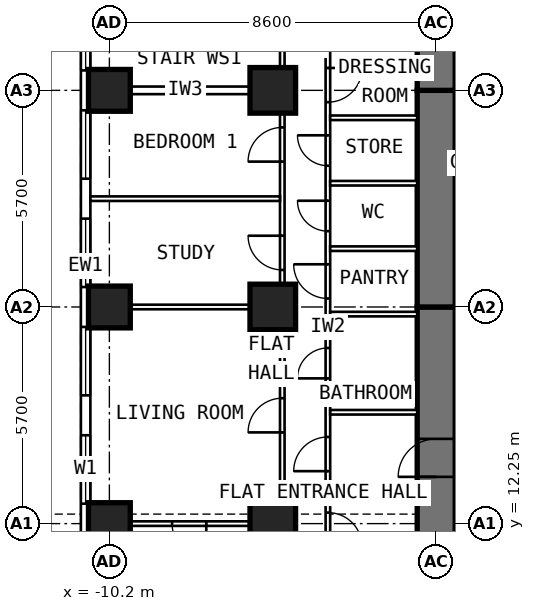
"""IFC4 building model, lengths in metres.
Left out: names, types, materials, properties, quantities, classifications, styles, units other than length and angle.
Written with IfcOpenShell. Run it as: python <this file> out.ifc"""

import sys

from ifc_helpers import new_model, si_unit, direction, frame, frame_2d, origin, origin_2d, place, context, subcontext, project, spatial, rectangle, extrude, element, fill, save


model = new_model("IFC4")
c1 = context("Model", 3, precision=1e-05, world=origin(), true_north=direction((0.0, 1.0)))
c2 = subcontext(c1, "Body", "Model", "MODEL_VIEW")
j1 = project(units=[si_unit("LENGTHUNIT", "METRE"), si_unit("PLANEANGLEUNIT", "RADIAN")], contexts=[c1])
p1 = place(None, origin())
s1 = spatial("IfcSite", under=j1, at=p1, CompositionType="ELEMENT")
p2 = place(p1, origin())
s2 = spatial("IfcBuilding", under=s1, at=p2, CompositionType="ELEMENT")
p3 = place(p2, frame((0.0, 0.0, 28.8)))
s3 = spatial("IfcBuildingStorey", under=s2, at=p3, CompositionType="ELEMENT", Elevation=28.8)
for number, where, z_axis, x_axis in (
    (1, (-10.2, 12.25, 0.0), (0.0, 0.0, 1.0), (0.0, 1.0, 0.0)),
    (2, (-10.2, 17.95, 0.0), (0.0, 0.0, 1.0), (0.0, 1.0, 0.0)),
    (3, (-10.2, 23.65, 0.0), (0.0, 0.0, 1.0), (0.0, 1.0, 0.0)),
):
    element("IfcColumn", number, at=place(p3, frame(where, z_axis=z_axis, x_axis=x_axis)), inside=s3, PredefinedType="COLUMN", context=c2, shape_type="SweptSolid", body=[
        extrude(rectangle(XDim=1.1, YDim=1.1, at=origin_2d()), origin(), (0.0, 0.0, 1.0), 3.6),
    ])
for number, where, z_axis, x_axis in (
    (4, (-5.9, 12.25, 0.0), (0.0, 0.0, 1.0), (0.0, 1.0, 0.0)),
    (5, (-5.9, 17.95, 0.0), (0.0, 0.0, 1.0), (0.0, 1.0, 0.0)),
    (6, (-5.9, 23.65, 0.0), (0.0, 0.0, 1.0), (0.0, 1.0, 0.0)),
):
    element("IfcColumn", number, at=place(p3, frame(where, z_axis=z_axis, x_axis=x_axis)), inside=s3, PredefinedType="COLUMN", context=c2, shape_type="SweptSolid", body=[
        extrude(rectangle(XDim=1.2, YDim=1.2, at=origin_2d()), origin(), (0.0, 0.0, 1.0), 3.6),
    ])
p4 = place(p3, frame((-1.6, 9.6, 0.0), z_axis=(0.0, 0.0, 1.0), x_axis=(0.0, 1.0, 0.0)))
e7 = element("IfcWall", 7, at=p4, inside=s3, PredefinedType="SHEAR", context=c2, shape_type="SweptSolid", body=[
    extrude(rectangle(XDim=8.35, YDim=1.0, at=frame_2d((4.175, 0.0))), origin(), (0.0, 0.0, 1.0), 3.6),
])
p5 = place(p4, frame((3.88, 0.0, 0.0)))
e8 = element("IfcOpeningElement", 8, at=p5, cuts=e7, PredefinedType="OPENING", context=c2, shape_type="SweptSolid", body=[
    extrude(rectangle(XDim=1.0, YDim=2.1, at=frame_2d((0.5, 1.05))), frame((0.0, 0.512, 0.0), z_axis=(0.0, -1.0, 0.0), x_axis=(1.0, 0.0, 0.0)), (0.0, 0.0, 1.0), 1.024),
])
p6 = place(p3, frame((-1.6, 17.95, 0.0), z_axis=(0.0, 0.0, 1.0), x_axis=(0.0, 1.0, 0.0)))
e9 = element("IfcWall", 9, at=p6, inside=s3, PredefinedType="SHEAR", context=c2, shape_type="SweptSolid", body=[
    extrude(rectangle(XDim=5.7, YDim=1.0, at=frame_2d((2.85, 0.0))), origin(), (0.0, 0.0, 1.0), 3.6),
])
p7 = place(p3, frame((-1.6, 23.65, 0.0), z_axis=(0.0, 0.0, 1.0), x_axis=(0.0, 1.0, 0.0)))
e10 = element("IfcWall", 10, at=p7, inside=s3, PredefinedType="SHEAR", context=c2, shape_type="SweptSolid", body=[
    extrude(rectangle(XDim=10.745, YDim=1.0, at=frame_2d((5.373, 0.0))), origin(), (0.0, 0.0, 1.0), 3.6),
])
p8 = place(p7, frame((6.1, 0.0, 0.0)))
e11 = element("IfcOpeningElement", 11, at=p8, cuts=e10, PredefinedType="OPENING", context=c2, shape_type="SweptSolid", body=[
    extrude(rectangle(XDim=1.0, YDim=2.1, at=frame_2d((0.5, 1.05))), frame((0.0, 0.512, 0.0), z_axis=(0.0, -1.0, 0.0), x_axis=(1.0, 0.0, 0.0)), (0.0, 0.0, 1.0), 1.024),
])
p9 = place(p7, frame((1.35, 0.0, 0.0)))
e12 = element("IfcOpeningElement", 12, at=p9, cuts=e10, PredefinedType="OPENING", context=c2, shape_type="SweptSolid", body=[
    extrude(rectangle(XDim=1.0, YDim=2.1, at=frame_2d((0.5, 1.05))), frame((0.0, 0.512, 0.0), z_axis=(0.0, -1.0, 0.0), x_axis=(1.0, 0.0, 0.0)), (0.0, 0.0, 1.0), 1.024),
])
p10 = place(p3, frame((-10.825, 6.409, 0.0), z_axis=(0.0, 0.0, 1.0), x_axis=(0.0, 1.0, 0.0)))
e13 = element("IfcWall", 13, at=p10, inside=s3, PredefinedType="SOLIDWALL", context=c2, shape_type="SweptSolid", body=[
    extrude(rectangle(XDim=25.226, YDim=0.25, at=frame_2d((12.613, 0.0))), origin(), (0.0, 0.0, 1.0), 3.3),
])
p11 = place(p10, frame((0.666, 0.0, 0.8)))
e14 = element("IfcOpeningElement", 14, at=p11, cuts=e13, PredefinedType="OPENING", context=c2, shape_type="SweptSolid", body=[
    extrude(rectangle(XDim=1.8, YDim=1.8, at=frame_2d((0.9, 0.9))), frame((0.0, 0.137, 0.0), z_axis=(0.0, -1.0, 0.0), x_axis=(1.0, 0.0, 0.0)), (0.0, 0.0, 1.0), 0.274),
])
p12 = place(p10, frame((3.516, 0.0, 0.8)))
e15 = element("IfcOpeningElement", 15, at=p12, cuts=e13, PredefinedType="OPENING", context=c2, shape_type="SweptSolid", body=[
    extrude(rectangle(XDim=1.8, YDim=1.8, at=frame_2d((0.9, 0.9))), frame((0.0, 0.137, 0.0), z_axis=(0.0, -1.0, 0.0), x_axis=(1.0, 0.0, 0.0)), (0.0, 0.0, 1.0), 0.274),
])
p13 = place(p10, frame((6.366, 0.0, 0.8)))
e16 = element("IfcOpeningElement", 16, at=p13, cuts=e13, PredefinedType="OPENING", context=c2, shape_type="SweptSolid", body=[
    extrude(rectangle(XDim=1.8, YDim=1.8, at=frame_2d((0.9, 0.9))), frame((0.0, 0.137, 0.0), z_axis=(0.0, -1.0, 0.0), x_axis=(1.0, 0.0, 0.0)), (0.0, 0.0, 1.0), 0.274),
])
p14 = place(p10, frame((9.216, 0.0, 0.8)))
e17 = element("IfcOpeningElement", 17, at=p14, cuts=e13, PredefinedType="OPENING", context=c2, shape_type="SweptSolid", body=[
    extrude(rectangle(XDim=1.8, YDim=1.8, at=frame_2d((0.9, 0.9))), frame((0.0, 0.137, 0.0), z_axis=(0.0, -1.0, 0.0), x_axis=(1.0, 0.0, 0.0)), (0.0, 0.0, 1.0), 0.274),
])
p15 = place(p10, frame((12.066, 0.0, 0.8)))
e18 = element("IfcOpeningElement", 18, at=p15, cuts=e13, PredefinedType="OPENING", context=c2, shape_type="SweptSolid", body=[
    extrude(rectangle(XDim=1.8, YDim=1.8, at=frame_2d((0.9, 0.9))), frame((0.0, 0.137, 0.0), z_axis=(0.0, -1.0, 0.0), x_axis=(1.0, 0.0, 0.0)), (0.0, 0.0, 1.0), 0.274),
])
p16 = place(p10, frame((14.916, 0.0, 0.8)))
e19 = element("IfcOpeningElement", 19, at=p16, cuts=e13, PredefinedType="OPENING", context=c2, shape_type="SweptSolid", body=[
    extrude(rectangle(XDim=1.8, YDim=1.8, at=frame_2d((0.9, 0.9))), frame((0.0, 0.137, 0.0), z_axis=(0.0, -1.0, 0.0), x_axis=(1.0, 0.0, 0.0)), (0.0, 0.0, 1.0), 0.274),
])
p17 = place(p10, frame((17.766, 0.0, 0.8)))
e20 = element("IfcOpeningElement", 20, at=p17, cuts=e13, PredefinedType="OPENING", context=c2, shape_type="SweptSolid", body=[
    extrude(rectangle(XDim=1.8, YDim=1.8, at=frame_2d((0.9, 0.9))), frame((0.0, 0.137, 0.0), z_axis=(0.0, -1.0, 0.0), x_axis=(1.0, 0.0, 0.0)), (0.0, 0.0, 1.0), 0.274),
])
p18 = place(p10, frame((20.616, 0.0, 0.8)))
e21 = element("IfcOpeningElement", 21, at=p18, cuts=e13, PredefinedType="OPENING", context=c2, shape_type="SweptSolid", body=[
    extrude(rectangle(XDim=1.8, YDim=1.8, at=frame_2d((0.9, 0.9))), frame((0.0, 0.137, 0.0), z_axis=(0.0, -1.0, 0.0), x_axis=(1.0, 0.0, 0.0)), (0.0, 0.0, 1.0), 0.274),
])
p19 = place(p3, frame((-4.45, 10.1, 0.0), z_axis=(0.0, 0.0, 1.0), x_axis=(0.0, 1.0, 0.0)))
e22 = element("IfcWall", 22, at=p19, inside=s3, PredefinedType="PARTITIONING", context=c2, shape_type="SweptSolid", body=[
    extrude(rectangle(XDim=14.65, YDim=0.12, at=frame_2d((7.325, 0.0))), origin(), (0.0, 0.0, 1.0), 3.3),
])
p20 = place(p19, frame((1.54, 0.0, 0.0)))
e23 = element("IfcOpeningElement", 23, at=p20, cuts=e22, PredefinedType="OPENING", context=c2, shape_type="SweptSolid", body=[
    extrude(rectangle(XDim=0.9, YDim=2.1, at=frame_2d((0.45, 1.05))), frame((0.0, 0.072, 0.0), z_axis=(0.0, -1.0, 0.0), x_axis=(1.0, 0.0, 0.0)), (0.0, 0.0, 1.0), 0.144),
])
p21 = place(p19, frame((3.53, 0.0, 0.0)))
e24 = element("IfcOpeningElement", 24, at=p21, cuts=e22, PredefinedType="OPENING", context=c2, shape_type="SweptSolid", body=[
    extrude(rectangle(XDim=0.9, YDim=2.1, at=frame_2d((0.45, 1.05))), frame((0.0, 0.072, 0.0), z_axis=(0.0, -1.0, 0.0), x_axis=(1.0, 0.0, 0.0)), (0.0, 0.0, 1.0), 0.144),
])
p22 = place(p19, frame((5.971, 0.0, 0.0)))
e25 = element("IfcOpeningElement", 25, at=p22, cuts=e22, PredefinedType="OPENING", context=c2, shape_type="SweptSolid", body=[
    extrude(rectangle(XDim=0.8, YDim=2.1, at=frame_2d((0.4, 1.05))), frame((0.0, 0.072, 0.0), z_axis=(0.0, -1.0, 0.0), x_axis=(1.0, 0.0, 0.0)), (0.0, 0.0, 1.0), 0.144),
])
p23 = place(p19, frame((8.074, 0.0, 0.0)))
e26 = element("IfcOpeningElement", 26, at=p23, cuts=e22, PredefinedType="OPENING", context=c2, shape_type="SweptSolid", body=[
    extrude(rectangle(XDim=0.9, YDim=2.1, at=frame_2d((0.45, 1.05))), frame((0.0, 0.072, 0.0), z_axis=(0.0, -1.0, 0.0), x_axis=(1.0, 0.0, 0.0)), (0.0, 0.0, 1.0), 0.144),
])
p24 = place(p19, frame((9.845, 0.0, 0.0)))
e27 = element("IfcOpeningElement", 27, at=p24, cuts=e22, PredefinedType="OPENING", context=c2, shape_type="SweptSolid", body=[
    extrude(rectangle(XDim=0.8, YDim=2.1, at=frame_2d((0.4, 1.05))), frame((0.0, 0.072, 0.0), z_axis=(0.0, -1.0, 0.0), x_axis=(1.0, 0.0, 0.0)), (0.0, 0.0, 1.0), 0.144),
])
p25 = place(p19, frame((11.567, 0.0, 0.0)))
e28 = element("IfcOpeningElement", 28, at=p25, cuts=e22, PredefinedType="OPENING", context=c2, shape_type="SweptSolid", body=[
    extrude(rectangle(XDim=0.8, YDim=2.1, at=frame_2d((0.4, 1.05))), frame((0.0, 0.072, 0.0), z_axis=(0.0, -1.0, 0.0), x_axis=(1.0, 0.0, 0.0)), (0.0, 0.0, 1.0), 0.144),
])
p26 = place(p19, frame((13.239, 0.0, 0.0)))
e29 = element("IfcOpeningElement", 29, at=p26, cuts=e22, PredefinedType="OPENING", context=c2, shape_type="SweptSolid", body=[
    extrude(rectangle(XDim=0.9, YDim=2.1, at=frame_2d((0.45, 1.05))), frame((0.0, 0.072, 0.0), z_axis=(0.0, -1.0, 0.0), x_axis=(1.0, 0.0, 0.0)), (0.0, 0.0, 1.0), 0.144),
])
p27 = place(p3, frame((-5.65, 9.6, 0.0), z_axis=(0.0, 0.0, 1.0), x_axis=(0.0, 1.0, 0.0)))
e30 = element("IfcWall", 30, at=p27, inside=s3, PredefinedType="PARTITIONING", context=c2, shape_type="SweptSolid", body=[
    extrude(rectangle(XDim=15.15, YDim=0.12, at=frame_2d((7.575, 0.0))), origin(), (0.0, 0.0, 1.0), 3.3),
])
p28 = place(p27, frame((5.05, 0.0, 0.0)))
e31 = element("IfcOpeningElement", 31, at=p28, cuts=e30, PredefinedType="OPENING", context=c2, shape_type="SweptSolid", body=[
    extrude(rectangle(XDim=0.9, YDim=2.1, at=frame_2d((0.45, 1.05))), frame((0.0, 0.072, 0.0), z_axis=(0.0, -1.0, 0.0), x_axis=(1.0, 0.0, 0.0)), (0.0, 0.0, 1.0), 0.144),
])
p29 = place(p27, frame((9.325, 0.0, 0.0)))
e32 = element("IfcOpeningElement", 32, at=p29, cuts=e30, PredefinedType="OPENING", context=c2, shape_type="SweptSolid", body=[
    extrude(rectangle(XDim=0.9, YDim=2.1, at=frame_2d((0.45, 1.05))), frame((0.0, 0.072, 0.0), z_axis=(0.0, -1.0, 0.0), x_axis=(1.0, 0.0, 0.0)), (0.0, 0.0, 1.0), 0.144),
])
p30 = place(p27, frame((12.175, 0.0, 0.0)))
e33 = element("IfcOpeningElement", 33, at=p30, cuts=e30, PredefinedType="OPENING", context=c2, shape_type="SweptSolid", body=[
    extrude(rectangle(XDim=0.9, YDim=2.1, at=frame_2d((0.45, 1.05))), frame((0.0, 0.072, 0.0), z_axis=(0.0, -1.0, 0.0), x_axis=(1.0, 0.0, 0.0)), (0.0, 0.0, 1.0), 0.144),
])
p31 = place(p3, frame((-5.71, 12.25, 0.0), z_axis=(0.0, 0.0, 1.0), x_axis=(-1.0, 0.0, 0.0)))
e34 = element("IfcWall", 34, at=p31, inside=s3, PredefinedType="PARTITIONING", context=c2, shape_type="SweptSolid", body=[
    extrude(rectangle(XDim=4.99, YDim=0.12, at=frame_2d((2.495, 0.0))), origin(), (0.0, 0.0, 1.0), 2.3),
])
p32 = place(p31, frame((1.94, 0.0, 0.0)))
e35 = element("IfcOpeningElement", 35, at=p32, cuts=e34, PredefinedType="OPENING", context=c2, shape_type="SweptSolid", body=[
    extrude(rectangle(XDim=0.9, YDim=2.1, at=frame_2d((0.45, 1.05))), frame((0.0, 0.072, 0.0), z_axis=(0.0, -1.0, 0.0), x_axis=(1.0, 0.0, 0.0)), (0.0, 0.0, 1.0), 0.144),
])
for number, where, z_axis, x_axis in (
    (36, (-5.71, 17.95, 0.0), (0.0, 0.0, 1.0), (-1.0, 0.0, 0.0)),
    (37, (-5.71, 20.8, 0.0), (0.0, 0.0, 1.0), (-1.0, 0.0, 0.0)),
):
    element("IfcWall", number, at=place(p3, frame(where, z_axis=z_axis, x_axis=x_axis)), inside=s3, PredefinedType="PARTITIONING", context=c2, shape_type="SweptSolid", body=[
        extrude(rectangle(XDim=4.99, YDim=0.12, at=frame_2d((2.495, 0.0))), origin(), (0.0, 0.0, 1.0), 3.3),
    ])
for number, where, z_axis, x_axis in (
    (38, (-2.1, 12.98, 0.0), (0.0, 0.0, 1.0), (-1.0, 0.0, 0.0)),
    (39, (-2.1, 15.18, 0.0), (0.0, 0.0, 1.0), (-1.0, 0.0, 0.0)),
    (40, (-2.1, 17.763, 0.0), (0.0, 0.0, 1.0), (-1.0, 0.0, 0.0)),
    (41, (-2.1, 19.485, 0.0), (0.0, 0.0, 1.0), (-1.0, 0.0, 0.0)),
    (42, (-2.1, 21.206, 0.0), (0.0, 0.0, 1.0), (-1.0, 0.0, 0.0)),
    (43, (-2.1, 22.928, 0.0), (0.0, 0.0, 1.0), (-1.0, 0.0, 0.0)),
):
    element("IfcWall", number, at=place(p3, frame(where, z_axis=z_axis, x_axis=x_axis)), inside=s3, PredefinedType="PARTITIONING", context=c2, shape_type="SweptSolid", body=[
        extrude(rectangle(XDim=2.29, YDim=0.12, at=frame_2d((1.145, 0.0))), origin(), (0.0, 0.0, 1.0), 3.3),
    ])
p33 = place(p3, frame((-5.71, 23.65, 0.0), z_axis=(0.0, 0.0, 1.0), x_axis=(-1.0, 0.0, 0.0)))
e44 = element("IfcWall", 44, at=p33, inside=s3, PredefinedType="PARTITIONING", context=c2, shape_type="SweptSolid", body=[
    extrude(rectangle(XDim=4.99, YDim=0.2, at=frame_2d((2.495, 0.0))), origin(), (0.0, 0.0, 1.0), 3.3),
])
p34 = place(p13, origin())
e45 = element("IfcWindow", 45, at=p34, inside=s3, PartitioningType="SINGLE_PANEL", PredefinedType="WINDOW", context=c2, shape_type="SweptSolid", body=[
    extrude(rectangle(XDim=1.8, YDim=1.8, at=frame_2d((0.9, 0.9))), frame((0.0, 0.03, 0.0), z_axis=(0.0, -1.0, 0.0), x_axis=(1.0, 0.0, 0.0)), (0.0, 0.0, 1.0), 0.06),
])
fill(e16, e45)
p35 = place(p14, origin())
e46 = element("IfcWindow", 46, at=p35, inside=s3, PartitioningType="SINGLE_PANEL", PredefinedType="WINDOW", context=c2, shape_type="SweptSolid", body=[
    extrude(rectangle(XDim=1.8, YDim=1.8, at=frame_2d((0.9, 0.9))), frame((0.0, 0.03, 0.0), z_axis=(0.0, -1.0, 0.0), x_axis=(1.0, 0.0, 0.0)), (0.0, 0.0, 1.0), 0.06),
])
fill(e17, e46)
p36 = place(p15, origin())
e47 = element("IfcWindow", 47, at=p36, inside=s3, PartitioningType="SINGLE_PANEL", PredefinedType="WINDOW", context=c2, shape_type="SweptSolid", body=[
    extrude(rectangle(XDim=1.8, YDim=1.8, at=frame_2d((0.9, 0.9))), frame((0.0, 0.03, 0.0), z_axis=(0.0, -1.0, 0.0), x_axis=(1.0, 0.0, 0.0)), (0.0, 0.0, 1.0), 0.06),
])
fill(e18, e47)
p37 = place(p16, origin())
e48 = element("IfcWindow", 48, at=p37, inside=s3, PartitioningType="SINGLE_PANEL", PredefinedType="WINDOW", context=c2, shape_type="SweptSolid", body=[
    extrude(rectangle(XDim=1.8, YDim=1.8, at=frame_2d((0.9, 0.9))), frame((0.0, 0.03, 0.0), z_axis=(0.0, -1.0, 0.0), x_axis=(1.0, 0.0, 0.0)), (0.0, 0.0, 1.0), 0.06),
])
fill(e19, e48)
p38 = place(p17, origin())
e49 = element("IfcWindow", 49, at=p38, inside=s3, PartitioningType="SINGLE_PANEL", PredefinedType="WINDOW", context=c2, shape_type="SweptSolid", body=[
    extrude(rectangle(XDim=1.8, YDim=1.8, at=frame_2d((0.9, 0.9))), frame((0.0, 0.03, 0.0), z_axis=(0.0, -1.0, 0.0), x_axis=(1.0, 0.0, 0.0)), (0.0, 0.0, 1.0), 0.06),
])
fill(e20, e49)
p39 = place(p32, origin())
e50 = element("IfcDoor", 50, at=p39, inside=s3, OperationType="SINGLE_SWING_LEFT", PredefinedType="DOOR", context=c2, shape_type="SweptSolid", body=[
    extrude(rectangle(XDim=0.9, YDim=2.1, at=frame_2d((0.45, 1.05))), frame((0.0, 0.025, 0.0), z_axis=(0.0, -1.0, 0.0), x_axis=(1.0, 0.0, 0.0)), (0.0, 0.0, 1.0), 0.05),
])
fill(e35, e50)
p40 = place(p5, origin())
e51 = element("IfcDoor", 51, at=p40, inside=s3, OperationType="SINGLE_SWING_LEFT", PredefinedType="DOOR", context=c2, shape_type="SweptSolid", body=[
    extrude(rectangle(XDim=1.0, YDim=2.1, at=frame_2d((0.5, 1.05))), frame((0.0, 0.25, 0.0), z_axis=(0.0, -1.0, 0.0), x_axis=(1.0, 0.0, 0.0)), (0.0, 0.0, 1.0), 0.5),
])
fill(e8, e51)
p41 = place(p28, origin())
e52 = element("IfcDoor", 52, at=p41, inside=s3, OperationType="SINGLE_SWING_LEFT", PredefinedType="DOOR", context=c2, shape_type="SweptSolid", body=[
    extrude(rectangle(XDim=0.9, YDim=2.1, at=frame_2d((0.45, 1.05))), frame((0.0, 0.025, 0.0), z_axis=(0.0, -1.0, 0.0), x_axis=(1.0, 0.0, 0.0)), (0.0, 0.0, 1.0), 0.05),
])
fill(e31, e52)
p42 = place(p29, origin())
e53 = element("IfcDoor", 53, at=p42, inside=s3, OperationType="SINGLE_SWING_RIGHT", PredefinedType="DOOR", context=c2, shape_type="SweptSolid", body=[
    extrude(rectangle(XDim=0.9, YDim=2.1, at=frame_2d((0.45, 1.05))), frame((0.0, 0.025, 0.0), z_axis=(0.0, -1.0, 0.0), x_axis=(1.0, 0.0, 0.0)), (0.0, 0.0, 1.0), 0.05),
])
fill(e32, e53)
p43 = place(p30, origin())
e54 = element("IfcDoor", 54, at=p43, inside=s3, OperationType="SINGLE_SWING_LEFT", PredefinedType="DOOR", context=c2, shape_type="SweptSolid", body=[
    extrude(rectangle(XDim=0.9, YDim=2.1, at=frame_2d((0.45, 1.05))), frame((0.0, 0.025, 0.0), z_axis=(0.0, -1.0, 0.0), x_axis=(1.0, 0.0, 0.0)), (0.0, 0.0, 1.0), 0.05),
])
fill(e33, e54)
p44 = place(p20, frame((0.9, 0.0, 0.0), z_axis=(0.0, 0.0, 1.0), x_axis=(-1.0, 0.0, 0.0)))
e55 = element("IfcDoor", 55, at=p44, inside=s3, OperationType="SINGLE_SWING_RIGHT", PredefinedType="DOOR", context=c2, shape_type="SweptSolid", body=[
    extrude(rectangle(XDim=0.9, YDim=2.1, at=frame_2d((0.45, 1.05))), frame((0.0, 0.025, 0.0), z_axis=(0.0, -1.0, 0.0), x_axis=(1.0, 0.0, 0.0)), (0.0, 0.0, 1.0), 0.05),
])
fill(e23, e55)
p45 = place(p21, origin())
e56 = element("IfcDoor", 56, at=p45, inside=s3, OperationType="SINGLE_SWING_LEFT", PredefinedType="DOOR", context=c2, shape_type="SweptSolid", body=[
    extrude(rectangle(XDim=0.9, YDim=2.1, at=frame_2d((0.45, 1.05))), frame((0.0, 0.025, 0.0), z_axis=(0.0, -1.0, 0.0), x_axis=(1.0, 0.0, 0.0)), (0.0, 0.0, 1.0), 0.05),
])
fill(e24, e56)
p46 = place(p22, origin())
e57 = element("IfcDoor", 57, at=p46, inside=s3, OperationType="SINGLE_SWING_LEFT", PredefinedType="DOOR", context=c2, shape_type="SweptSolid", body=[
    extrude(rectangle(XDim=0.8, YDim=2.1, at=frame_2d((0.4, 1.05))), frame((0.0, 0.025, 0.0), z_axis=(0.0, -1.0, 0.0), x_axis=(1.0, 0.0, 0.0)), (0.0, 0.0, 1.0), 0.05),
])
fill(e25, e57)
p47 = place(p23, origin())
e58 = element("IfcDoor", 58, at=p47, inside=s3, OperationType="SINGLE_SWING_RIGHT", PredefinedType="DOOR", context=c2, shape_type="SweptSolid", body=[
    extrude(rectangle(XDim=0.9, YDim=2.1, at=frame_2d((0.45, 1.05))), frame((0.0, 0.025, 0.0), z_axis=(0.0, -1.0, 0.0), x_axis=(1.0, 0.0, 0.0)), (0.0, 0.0, 1.0), 0.05),
])
fill(e26, e58)
p48 = place(p24, origin())
e59 = element("IfcDoor", 59, at=p48, inside=s3, OperationType="SINGLE_SWING_RIGHT", PredefinedType="DOOR", context=c2, shape_type="SweptSolid", body=[
    extrude(rectangle(XDim=0.8, YDim=2.1, at=frame_2d((0.4, 1.05))), frame((0.0, 0.025, 0.0), z_axis=(0.0, -1.0, 0.0), x_axis=(1.0, 0.0, 0.0)), (0.0, 0.0, 1.0), 0.05),
])
fill(e27, e59)
p49 = place(p25, origin())
e60 = element("IfcDoor", 60, at=p49, inside=s3, OperationType="SINGLE_SWING_RIGHT", PredefinedType="DOOR", context=c2, shape_type="SweptSolid", body=[
    extrude(rectangle(XDim=0.8, YDim=2.1, at=frame_2d((0.4, 1.05))), frame((0.0, 0.025, 0.0), z_axis=(0.0, -1.0, 0.0), x_axis=(1.0, 0.0, 0.0)), (0.0, 0.0, 1.0), 0.05),
])
fill(e28, e60)
p50 = place(p26, frame((0.9, 0.0, 0.0), z_axis=(0.0, 0.0, 1.0), x_axis=(-1.0, 0.0, 0.0)))
e61 = element("IfcDoor", 61, at=p50, inside=s3, OperationType="SINGLE_SWING_LEFT", PredefinedType="DOOR", context=c2, shape_type="SweptSolid", body=[
    extrude(rectangle(XDim=0.9, YDim=2.1, at=frame_2d((0.45, 1.05))), frame((0.0, 0.025, 0.0), z_axis=(0.0, -1.0, 0.0), x_axis=(1.0, 0.0, 0.0)), (0.0, 0.0, 1.0), 0.05),
])
fill(e29, e61)
save(model, sys.argv[1])
